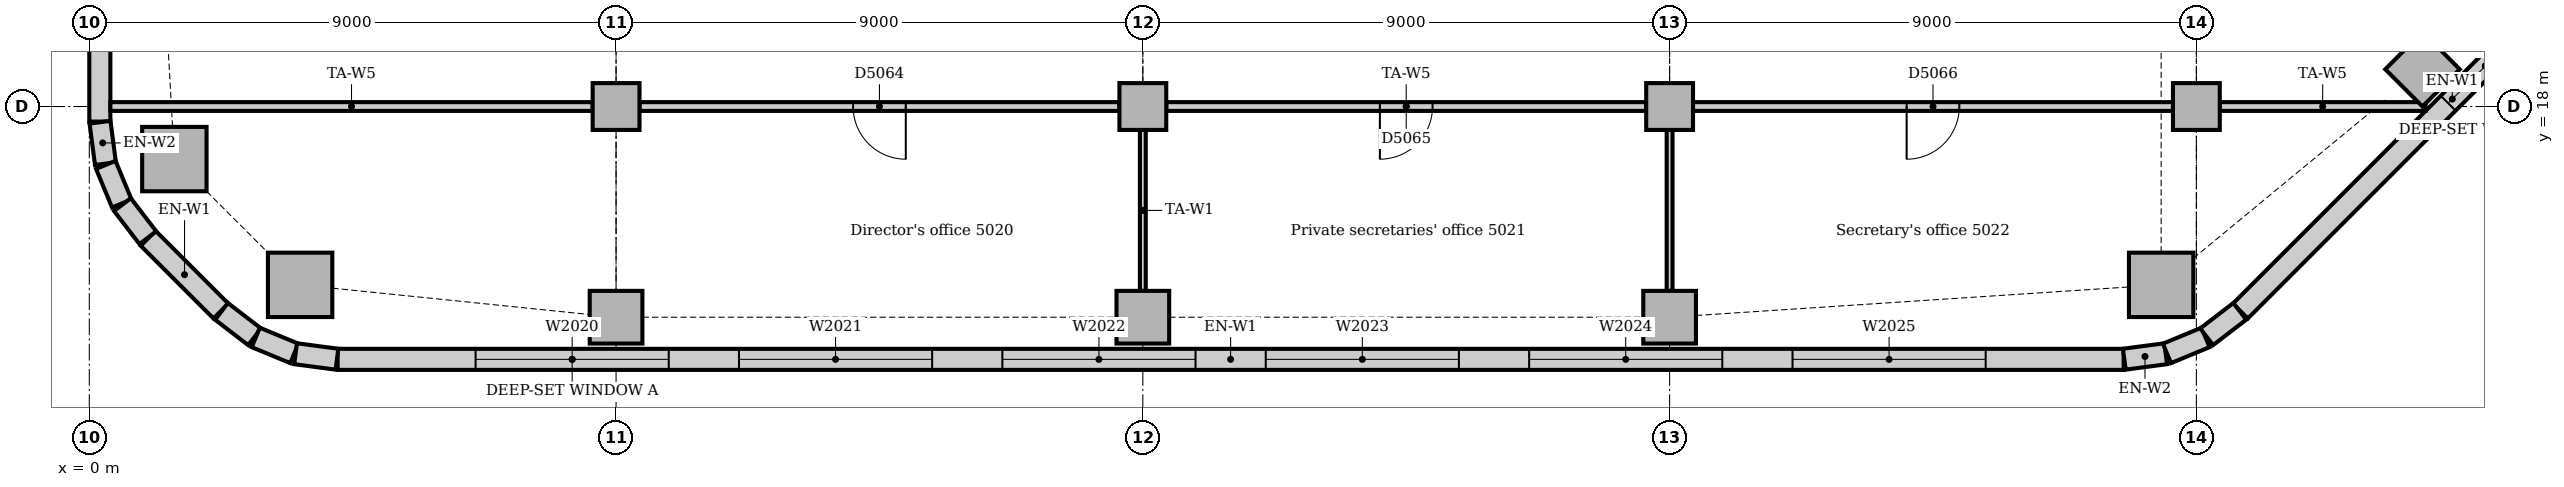
"""IFC4 building model, lengths in metres.
Left out: names, types, materials, properties, quantities, classifications, styles, units other than length and angle.
Written with IfcOpenShell. Run it as: python <this file> out.ifc"""

import sys

from ifc_helpers import new_model, si_unit, direction, frame, frame_2d, origin, origin_2d, place, context, subcontext, project, spatial, rectangle, extrude, element, fill, save


model = new_model("IFC4")
c1 = context("Model", 3, precision=1e-05, world=origin(), true_north=direction((0.0, 1.0)))
c2 = subcontext(c1, "Body", "Model", "MODEL_VIEW")
j1 = project(units=[si_unit("LENGTHUNIT", "METRE"), si_unit("PLANEANGLEUNIT", "RADIAN")], contexts=[c1])
p1 = place(None, origin())
s1 = spatial("IfcSite", under=j1, at=p1, CompositionType="ELEMENT")
p2 = place(p1, origin())
s2 = spatial("IfcBuilding", under=s1, at=p2, CompositionType="ELEMENT")
p3 = place(p2, frame((0.0, 0.0, 210.0)))
s3 = spatial("IfcBuildingStorey", under=s2, at=p3, CompositionType="ELEMENT", Elevation=210.0)
for number, where, z_axis, x_axis in (
    (1, (3.602, 14.953, 0.0), (0.0, 0.0, 1.0), (1.0, 0.0, 0.0)),
    (2, (35.398, 14.953, 0.0), (0.0, 0.0, 1.0), (1.0, 0.0, 0.0)),
    (3, (1.453, 17.102, 0.0), (0.0, 0.0, 1.0), (1.0, 0.0, 0.0)),
):
    element("IfcColumn", number, at=place(p3, frame(where, z_axis=z_axis, x_axis=x_axis)), inside=s3, PredefinedType="COLUMN", context=c2, shape_type="SweptSolid", body=[
        extrude(rectangle(XDim=1.1, YDim=1.1, at=origin_2d()), origin(), (0.0, 0.0, 1.0), 3.85),
    ])
for number, where, z_axis, x_axis in (
    (4, (9.0, 14.4, 0.0), (0.0, 0.0, 1.0), (1.0, 0.0, 0.0)),
    (5, (18.0, 14.4, 0.0), (0.0, 0.0, 1.0), (1.0, 0.0, 0.0)),
    (6, (27.0, 14.4, 0.0), (0.0, 0.0, 1.0), (1.0, 0.0, 0.0)),
    (7, (39.864, 18.636, 0.0), (0.0, 0.0, 1.0), (0.707, 0.707, 0.0)),
):
    element("IfcColumn", number, at=place(p3, frame(where, z_axis=z_axis, x_axis=x_axis)), inside=s3, PredefinedType="COLUMN", context=c2, shape_type="SweptSolid", body=[
        extrude(rectangle(XDim=0.9, YDim=0.9, at=origin_2d()), origin(), (0.0, 0.0, 1.0), 3.85),
    ])
for number, where, z_axis, x_axis in (
    (8, (9.0, 18.0, 0.0), (0.0, 0.0, 1.0), (1.0, 0.0, 0.0)),
    (9, (18.0, 18.0, 0.0), (0.0, 0.0, 1.0), (1.0, 0.0, 0.0)),
    (10, (27.0, 18.0, 0.0), (0.0, 0.0, 1.0), (1.0, 0.0, 0.0)),
    (11, (36.0, 18.0, 0.0), (0.0, 0.0, 1.0), (1.0, 0.0, 0.0)),
):
    element("IfcColumn", number, at=place(p3, frame(where, z_axis=z_axis, x_axis=x_axis)), inside=s3, PredefinedType="COLUMN", context=c2, shape_type="SweptSolid", body=[
        extrude(rectangle(XDim=0.8, YDim=0.8, at=origin_2d()), origin(), (0.0, 0.0, 1.0), 3.85),
    ])
p4 = place(p3, frame((4.243, 13.68, 0.0), z_axis=(0.0, 0.0, 1.0), x_axis=(1.0, 0.0, 0.0)))
e12 = element("IfcWall", 12, at=p4, inside=s3, PredefinedType="STANDARD", context=c2, shape_type="SweptSolid", body=[
    extrude(rectangle(XDim=30.515, YDim=0.36, at=frame_2d((15.257, 0.0))), origin(), (0.0, 0.0, 1.0), 3.85),
])
p5 = place(p4, frame((2.357, 0.0, 0.9)))
e13 = element("IfcOpeningElement", 13, at=p5, cuts=e12, PredefinedType="OPENING", context=c2, shape_type="SweptSolid", body=[
    extrude(rectangle(XDim=3.3, YDim=1.6, at=frame_2d((1.65, 0.8))), frame((0.0, 0.19, 0.0), z_axis=(0.0, -1.0, 0.0), x_axis=(1.0, 0.0, 0.0)), (0.0, 0.0, 1.0), 0.38),
])
p6 = place(p4, frame((6.857, 0.0, 0.9)))
e14 = element("IfcOpeningElement", 14, at=p6, cuts=e12, PredefinedType="OPENING", context=c2, shape_type="SweptSolid", body=[
    extrude(rectangle(XDim=3.3, YDim=1.6, at=frame_2d((1.65, 0.8))), frame((0.0, 0.19, 0.0), z_axis=(0.0, -1.0, 0.0), x_axis=(1.0, 0.0, 0.0)), (0.0, 0.0, 1.0), 0.38),
])
p7 = place(p4, frame((11.357, 0.0, 0.9)))
e15 = element("IfcOpeningElement", 15, at=p7, cuts=e12, PredefinedType="OPENING", context=c2, shape_type="SweptSolid", body=[
    extrude(rectangle(XDim=3.3, YDim=1.6, at=frame_2d((1.65, 0.8))), frame((0.0, 0.19, 0.0), z_axis=(0.0, -1.0, 0.0), x_axis=(1.0, 0.0, 0.0)), (0.0, 0.0, 1.0), 0.38),
])
p8 = place(p4, frame((15.857, 0.0, 0.9)))
e16 = element("IfcOpeningElement", 16, at=p8, cuts=e12, PredefinedType="OPENING", context=c2, shape_type="SweptSolid", body=[
    extrude(rectangle(XDim=3.3, YDim=1.6, at=frame_2d((1.65, 0.8))), frame((0.0, 0.19, 0.0), z_axis=(0.0, -1.0, 0.0), x_axis=(1.0, 0.0, 0.0)), (0.0, 0.0, 1.0), 0.38),
])
p9 = place(p4, frame((20.357, 0.0, 0.9)))
e17 = element("IfcOpeningElement", 17, at=p9, cuts=e12, PredefinedType="OPENING", context=c2, shape_type="SweptSolid", body=[
    extrude(rectangle(XDim=3.3, YDim=1.6, at=frame_2d((1.65, 0.8))), frame((0.0, 0.19, 0.0), z_axis=(0.0, -1.0, 0.0), x_axis=(1.0, 0.0, 0.0)), (0.0, 0.0, 1.0), 0.38),
])
p10 = place(p4, frame((24.857, 0.0, 0.9)))
e18 = element("IfcOpeningElement", 18, at=p10, cuts=e12, PredefinedType="OPENING", context=c2, shape_type="SweptSolid", body=[
    extrude(rectangle(XDim=3.3, YDim=1.6, at=frame_2d((1.65, 0.8))), frame((0.0, 0.19, 0.0), z_axis=(0.0, -1.0, 0.0), x_axis=(1.0, 0.0, 0.0)), (0.0, 0.0, 1.0), 0.38),
])
p11 = place(p3, frame((36.751, 14.506, 0.0), z_axis=(0.0, 0.0, 1.0), x_axis=(0.707106781187, 0.707106781187, 0.0)))
e19 = element("IfcWall", 19, at=p11, inside=s3, PredefinedType="STANDARD", context=c2, shape_type="SweptSolid", body=[
    extrude(rectangle(XDim=10.243, YDim=0.36, at=frame_2d((5.121, 0.0))), origin(), (0.0, 0.0, 1.0), 3.85),
])
p12 = place(p11, frame((5.021, 0.0, 0.9)))
e20 = element("IfcOpeningElement", 20, at=p12, cuts=e19, PredefinedType="OPENING", context=c2, shape_type="SweptSolid", body=[
    extrude(rectangle(XDim=1.8, YDim=1.6, at=frame_2d((0.9, 0.8))), frame((0.0, 0.19, 0.0), z_axis=(0.0, -1.0, 0.0), x_axis=(1.0, 0.0, 0.0)), (0.0, 0.0, 1.0), 0.38),
])
p13 = place(p3, frame((0.18, 21.0, 0.0), z_axis=(0.0, 0.0, 1.0), x_axis=(0.0, -1.0, 0.0)))
e21 = element("IfcWall", 21, at=p13, inside=s3, PredefinedType="STANDARD", context=c2, shape_type="SweptSolid", body=[
    extrude(rectangle(XDim=3.257, YDim=0.36, at=frame_2d((1.629, 0.0))), origin(), (0.0, 0.0, 1.0), 3.85),
])
p14 = place(p3, frame((1.006, 15.749, 0.0), z_axis=(0.0, 0.0, 1.0), x_axis=(0.707106781187, -0.707106781187, 0.0)))
e22 = element("IfcWall", 22, at=p14, inside=s3, PredefinedType="STANDARD", context=c2, shape_type="SweptSolid", body=[
    extrude(rectangle(XDim=1.757, YDim=0.36, at=frame_2d((0.879, 0.0))), origin(), (0.0, 0.0, 1.0), 3.85),
])
for number, where, z_axis, x_axis in (
    (23, (34.769, 13.683, 0.0), (0.0, 0.0, 1.0), (0.991, 0.131, 0.0)),
    (24, (35.497, 13.782, 0.0), (0.0, 0.0, 1.0), (0.924, 0.383, 0.0)),
):
    element("IfcWall", number, at=place(p3, frame(where, z_axis=z_axis, x_axis=x_axis)), inside=s3, PredefinedType="STANDARD", context=c2, shape_type="SweptSolid", body=[
        extrude(rectangle(XDim=0.713, YDim=0.36, at=frame_2d((0.356, 0.0))), origin(), (0.0, 0.0, 1.0), 3.85),
    ])
p15 = place(p3, frame((36.175, 14.066, 0.0), z_axis=(0.0, 0.0, 1.0), x_axis=(0.793321924995, 0.608802368033, 0.0)))
e25 = element("IfcWall", 25, at=p15, inside=s3, PredefinedType="STANDARD", context=c2, shape_type="SweptSolid", body=[
    extrude(rectangle(XDim=0.713, YDim=0.36, at=frame_2d((0.357, 0.0))), origin(), (0.0, 0.0, 1.0), 3.85),
])
for number, where, z_axis, x_axis in (
    (26, (0.183, 17.731, 0.0), (0.0, 0.0, 1.0), (0.131, -0.991, 0.0)),
    (27, (0.282, 17.003, 0.0), (0.0, 0.0, 1.0), (0.383, -0.924, 0.0)),
):
    element("IfcWall", number, at=place(p3, frame(where, z_axis=z_axis, x_axis=x_axis)), inside=s3, PredefinedType="STANDARD", context=c2, shape_type="SweptSolid", body=[
        extrude(rectangle(XDim=0.713, YDim=0.36, at=frame_2d((0.356, 0.0))), origin(), (0.0, 0.0, 1.0), 3.85),
    ])
for number, where, z_axis, x_axis in (
    (28, (0.566, 16.325, 0.0), (0.0, 0.0, 1.0), (0.609, -0.793, 0.0)),
    (29, (2.259, 14.5, 0.0), (0.0, 0.0, 1.0), (0.793, -0.609, 0.0)),
):
    element("IfcWall", number, at=place(p3, frame(where, z_axis=z_axis, x_axis=x_axis)), inside=s3, PredefinedType="STANDARD", context=c2, shape_type="SweptSolid", body=[
        extrude(rectangle(XDim=0.713, YDim=0.36, at=frame_2d((0.357, 0.0))), origin(), (0.0, 0.0, 1.0), 3.85),
    ])
for number, where, z_axis, x_axis in (
    (30, (2.844, 14.055, 0.0), (0.0, 0.0, 1.0), (0.924, -0.383, 0.0)),
    (31, (3.524, 13.776, 0.0), (0.0, 0.0, 1.0), (0.991, -0.131, 0.0)),
):
    element("IfcWall", number, at=place(p3, frame(where, z_axis=z_axis, x_axis=x_axis)), inside=s3, PredefinedType="STANDARD", context=c2, shape_type="SweptSolid", body=[
        extrude(rectangle(XDim=0.713, YDim=0.36, at=frame_2d((0.356, 0.0))), origin(), (0.0, 0.0, 1.0), 3.85),
    ])
p16 = place(p3, frame((36.4, 18.0, 0.0), z_axis=(0.0, 0.0, 1.0), x_axis=(1.0, 0.0, 0.0)))
e32 = element("IfcWall", 32, at=p16, inside=s3, PredefinedType="PARTITIONING", context=c2, shape_type="SweptSolid", body=[
    extrude(rectangle(XDim=3.516, YDim=0.15, at=frame_2d((1.758, 0.0))), origin(), (0.0, 0.0, 1.0), 3.602),
])
p17 = place(p3, frame((27.4, 18.0, 0.0), z_axis=(0.0, 0.0, 1.0), x_axis=(1.0, 0.0, 0.0)))
e33 = element("IfcWall", 33, at=p17, inside=s3, PredefinedType="PARTITIONING", context=c2, shape_type="SweptSolid", body=[
    extrude(rectangle(XDim=8.2, YDim=0.15, at=frame_2d((4.1, 0.0))), origin(), (0.0, 0.0, 1.0), 3.254),
])
p18 = place(p17, frame((3.65, 0.0, 0.0)))
e34 = element("IfcOpeningElement", 34, at=p18, cuts=e33, PredefinedType="OPENING", context=c2, shape_type="SweptSolid", body=[
    extrude(rectangle(XDim=0.9, YDim=2.1, at=frame_2d((0.45, 1.05))), frame((0.0, 0.085, 0.0), z_axis=(0.0, -1.0, 0.0), x_axis=(1.0, 0.0, 0.0)), (0.0, 0.0, 1.0), 0.17),
])
p19 = place(p3, frame((18.4, 18.0, 0.0), z_axis=(0.0, 0.0, 1.0), x_axis=(1.0, 0.0, 0.0)))
e35 = element("IfcWall", 35, at=p19, inside=s3, PredefinedType="PARTITIONING", context=c2, shape_type="SweptSolid", body=[
    extrude(rectangle(XDim=8.2, YDim=0.15, at=frame_2d((4.1, 0.0))), origin(), (0.0, 0.0, 1.0), 3.254),
])
p20 = place(p19, frame((3.65, 0.0, 0.0)))
e36 = element("IfcOpeningElement", 36, at=p20, cuts=e35, PredefinedType="OPENING", context=c2, shape_type="SweptSolid", body=[
    extrude(rectangle(XDim=0.9, YDim=2.1, at=frame_2d((0.45, 1.05))), frame((0.0, 0.085, 0.0), z_axis=(0.0, -1.0, 0.0), x_axis=(1.0, 0.0, 0.0)), (0.0, 0.0, 1.0), 0.17),
])
p21 = place(p3, frame((9.4, 18.0, 0.0), z_axis=(0.0, 0.0, 1.0), x_axis=(1.0, 0.0, 0.0)))
e37 = element("IfcWall", 37, at=p21, inside=s3, PredefinedType="PARTITIONING", context=c2, shape_type="SweptSolid", body=[
    extrude(rectangle(XDim=8.2, YDim=0.15, at=frame_2d((4.1, 0.0))), origin(), (0.0, 0.0, 1.0), 3.254),
])
p22 = place(p21, frame((3.65, 0.0, 0.0)))
e38 = element("IfcOpeningElement", 38, at=p22, cuts=e37, PredefinedType="OPENING", context=c2, shape_type="SweptSolid", body=[
    extrude(rectangle(XDim=0.9, YDim=2.1, at=frame_2d((0.45, 1.05))), frame((0.0, 0.085, 0.0), z_axis=(0.0, -1.0, 0.0), x_axis=(1.0, 0.0, 0.0)), (0.0, 0.0, 1.0), 0.17),
])
p23 = place(p3, frame((0.36, 18.0, 0.0), z_axis=(0.0, 0.0, 1.0), x_axis=(1.0, 0.0, 0.0)))
e39 = element("IfcWall", 39, at=p23, inside=s3, PredefinedType="PARTITIONING", context=c2, shape_type="SweptSolid", body=[
    extrude(rectangle(XDim=8.24, YDim=0.15, at=frame_2d((4.12, 0.0))), origin(), (0.0, 0.0, 1.0), 3.254),
])
for number, where, z_axis, x_axis in (
    (40, (18.0, 14.85, 0.0), (0.0, 0.0, 1.0), (0.0, 1.0, 0.0)),
    (41, (27.0, 14.85, 0.0), (0.0, 0.0, 1.0), (0.0, 1.0, 0.0)),
):
    element("IfcWall", number, at=place(p3, frame(where, z_axis=z_axis, x_axis=x_axis)), inside=s3, PredefinedType="PARTITIONING", context=c2, shape_type="SweptSolid", body=[
        extrude(rectangle(XDim=2.75, YDim=0.1, at=frame_2d((1.375, 0.0))), origin(), (0.0, 0.0, 1.0), 3.652),
    ])
p24 = place(p5, origin())
e42 = element("IfcWindow", 42, at=p24, inside=s3, PartitioningType="SINGLE_PANEL", PredefinedType="WINDOW", context=c2, shape_type="SweptSolid", body=[
    extrude(rectangle(XDim=3.3, YDim=1.6, at=frame_2d((1.65, 0.8))), frame((0.0, 0.13, 0.0), z_axis=(0.0, -1.0, 0.0), x_axis=(1.0, 0.0, 0.0)), (0.0, 0.0, 1.0), 0.06),
])
fill(e13, e42)
p25 = place(p6, origin())
e43 = element("IfcWindow", 43, at=p25, inside=s3, PartitioningType="SINGLE_PANEL", PredefinedType="WINDOW", context=c2, shape_type="SweptSolid", body=[
    extrude(rectangle(XDim=3.3, YDim=1.6, at=frame_2d((1.65, 0.8))), frame((0.0, 0.13, 0.0), z_axis=(0.0, -1.0, 0.0), x_axis=(1.0, 0.0, 0.0)), (0.0, 0.0, 1.0), 0.06),
])
fill(e14, e43)
p26 = place(p7, origin())
e44 = element("IfcWindow", 44, at=p26, inside=s3, PartitioningType="SINGLE_PANEL", PredefinedType="WINDOW", context=c2, shape_type="SweptSolid", body=[
    extrude(rectangle(XDim=3.3, YDim=1.6, at=frame_2d((1.65, 0.8))), frame((0.0, 0.13, 0.0), z_axis=(0.0, -1.0, 0.0), x_axis=(1.0, 0.0, 0.0)), (0.0, 0.0, 1.0), 0.06),
])
fill(e15, e44)
p27 = place(p8, origin())
e45 = element("IfcWindow", 45, at=p27, inside=s3, PartitioningType="SINGLE_PANEL", PredefinedType="WINDOW", context=c2, shape_type="SweptSolid", body=[
    extrude(rectangle(XDim=3.3, YDim=1.6, at=frame_2d((1.65, 0.8))), frame((0.0, 0.13, 0.0), z_axis=(0.0, -1.0, 0.0), x_axis=(1.0, 0.0, 0.0)), (0.0, 0.0, 1.0), 0.06),
])
fill(e16, e45)
p28 = place(p9, origin())
e46 = element("IfcWindow", 46, at=p28, inside=s3, PartitioningType="SINGLE_PANEL", PredefinedType="WINDOW", context=c2, shape_type="SweptSolid", body=[
    extrude(rectangle(XDim=3.3, YDim=1.6, at=frame_2d((1.65, 0.8))), frame((0.0, 0.13, 0.0), z_axis=(0.0, -1.0, 0.0), x_axis=(1.0, 0.0, 0.0)), (0.0, 0.0, 1.0), 0.06),
])
fill(e17, e46)
p29 = place(p10, origin())
e47 = element("IfcWindow", 47, at=p29, inside=s3, PartitioningType="SINGLE_PANEL", PredefinedType="WINDOW", context=c2, shape_type="SweptSolid", body=[
    extrude(rectangle(XDim=3.3, YDim=1.6, at=frame_2d((1.65, 0.8))), frame((0.0, 0.13, 0.0), z_axis=(0.0, -1.0, 0.0), x_axis=(1.0, 0.0, 0.0)), (0.0, 0.0, 1.0), 0.06),
])
fill(e18, e47)
p30 = place(p12, origin())
e48 = element("IfcWindow", 48, at=p30, inside=s3, PartitioningType="SINGLE_PANEL", PredefinedType="WINDOW", context=c2, shape_type="SweptSolid", body=[
    extrude(rectangle(XDim=1.8, YDim=1.6, at=frame_2d((0.9, 0.8))), frame((0.0, 0.13, 0.0), z_axis=(0.0, -1.0, 0.0), x_axis=(1.0, 0.0, 0.0)), (0.0, 0.0, 1.0), 0.06),
])
fill(e20, e48)
p31 = place(p22, frame((0.9, 0.0, 0.0), z_axis=(0.0, 0.0, 1.0), x_axis=(-1.0, 0.0, 0.0)))
e49 = element("IfcDoor", 49, at=p31, inside=s3, OperationType="SINGLE_SWING_LEFT", PredefinedType="DOOR", context=c2, shape_type="SweptSolid", body=[
    extrude(rectangle(XDim=0.9, YDim=2.1, at=frame_2d((0.45, 1.05))), frame((0.0, 0.025, 0.0), z_axis=(0.0, -1.0, 0.0), x_axis=(1.0, 0.0, 0.0)), (0.0, 0.0, 1.0), 0.05),
])
fill(e38, e49)
p32 = place(p20, frame((0.9, 0.0, 0.0), z_axis=(0.0, 0.0, 1.0), x_axis=(-1.0, 0.0, 0.0)))
e50 = element("IfcDoor", 50, at=p32, inside=s3, OperationType="SINGLE_SWING_RIGHT", PredefinedType="DOOR", context=c2, shape_type="SweptSolid", body=[
    extrude(rectangle(XDim=0.9, YDim=2.1, at=frame_2d((0.45, 1.05))), frame((0.0, 0.025, 0.0), z_axis=(0.0, -1.0, 0.0), x_axis=(1.0, 0.0, 0.0)), (0.0, 0.0, 1.0), 0.05),
])
fill(e36, e50)
p33 = place(p18, frame((0.9, 0.0, 0.0), z_axis=(0.0, 0.0, 1.0), x_axis=(-1.0, 0.0, 0.0)))
e51 = element("IfcDoor", 51, at=p33, inside=s3, OperationType="SINGLE_SWING_RIGHT", PredefinedType="DOOR", context=c2, shape_type="SweptSolid", body=[
    extrude(rectangle(XDim=0.9, YDim=2.1, at=frame_2d((0.45, 1.05))), frame((0.0, 0.025, 0.0), z_axis=(0.0, -1.0, 0.0), x_axis=(1.0, 0.0, 0.0)), (0.0, 0.0, 1.0), 0.05),
])
fill(e34, e51)
save(model, sys.argv[1])
